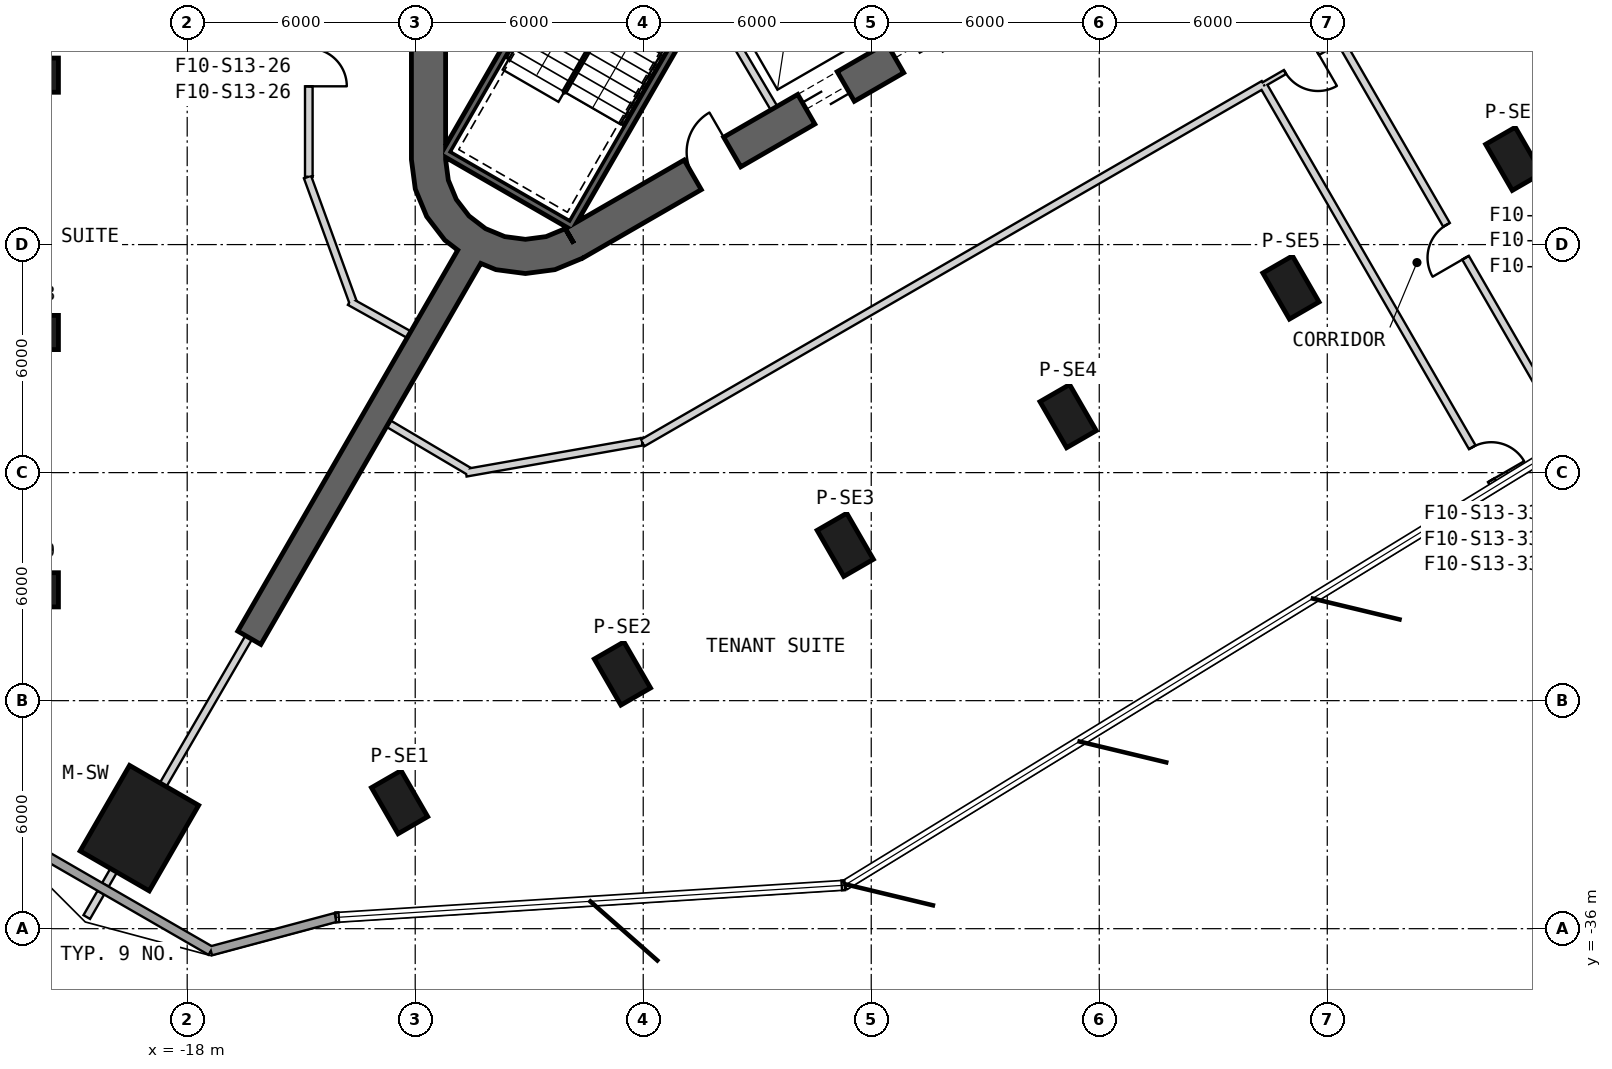
"""IFC4 building model, lengths in metres.
Left out: names, types, materials, properties, quantities, classifications, styles, units other than length and angle.
Written with IfcOpenShell. Run it as: python <this file> out.ifc"""

import sys

from ifc_helpers import new_model, si_unit, direction, frame, frame_2d, origin, origin_2d, place, context, subcontext, project, spatial, polyline, rectangle, outline, extrude, element, fill, save


model = new_model("IFC4")
c1 = context("Model", 3, precision=1e-05, world=origin(), true_north=direction((0.0, 1.0)))
c2 = subcontext(c1, "Body", "Model", "MODEL_VIEW")
j1 = project(units=[si_unit("LENGTHUNIT", "METRE"), si_unit("PLANEANGLEUNIT", "RADIAN")], contexts=[c1])
p1 = place(None, origin())
s1 = spatial("IfcSite", under=j1, at=p1, CompositionType="ELEMENT")
p2 = place(p1, origin())
s2 = spatial("IfcBuilding", under=s1, at=p2, CompositionType="ELEMENT")
p3 = place(p2, frame((0.0, 0.0, 217.2)))
s3 = spatial("IfcBuildingStorey", under=s2, at=p3, CompositionType="ELEMENT", Elevation=217.2)
p4 = place(p3, frame((-19.258, -33.355, 0.0), z_axis=(0.0, 0.0, 1.0), x_axis=(-0.5, -0.866025403784, 0.0)))
e1 = element("IfcColumn", 1, at=p4, inside=s3, PredefinedType="COLUMN", context=c2, shape_type="SweptSolid", body=[
    extrude(rectangle(XDim=2.6, YDim=2.1, at=origin_2d()), origin(), (0.0, 0.0, 1.0), 4.0),
])
for number, where, z_axis, x_axis in (
    (2, (-22.088, -13.542, 0.0), (0.0, 0.0, 1.0), (-1.0, 0.0, 0.0)),
    (3, (-22.088, -20.313, 0.0), (0.0, 0.0, 1.0), (-1.0, 0.0, 0.0)),
    (4, (-22.088, -27.084, 0.0), (0.0, 0.0, 1.0), (-1.0, 0.0, 0.0)),
    (5, (-12.411, -32.671, 0.0), (0.0, 0.0, 1.0), (0.5, -0.866, 0.0)),
    (6, (-6.548, -29.285, 0.0), (0.0, 0.0, 1.0), (0.5, -0.866, 0.0)),
    (7, (-0.684, -25.9, 0.0), (0.0, 0.0, 1.0), (0.5, -0.866, 0.0)),
    (8, (5.18, -22.514, 0.0), (0.0, 0.0, 1.0), (0.5, -0.866, 0.0)),
    (9, (11.044, -19.129, 0.0), (0.0, 0.0, 1.0), (0.5, -0.866, 0.0)),
    (10, (16.908, -15.743, 0.0), (0.0, 0.0, 1.0), (0.5, -0.866, 0.0)),
):
    element("IfcColumn", number, at=place(p3, frame(where, z_axis=z_axis, x_axis=x_axis)), inside=s3, PredefinedType="COLUMN", context=c2, shape_type="SweptSolid", body=[
        extrude(rectangle(XDim=1.4, YDim=0.9, at=origin_2d()), origin(), (0.0, 0.0, 1.0), 4.0),
    ])
p5 = place(p3, frame((-11.65, 15.762, 0.0), z_axis=(0.0, 0.0, 1.0), x_axis=(0.0, -1.0, 0.0)))
e11 = element("IfcWall", 11, at=p5, inside=s3, PredefinedType="SHEAR", context=c2, shape_type="SweptSolid", body=[
    extrude(rectangle(XDim=31.523, YDim=0.9, at=frame_2d((15.762, 0.0))), origin(), (0.0, 0.0, 1.0), 4.0),
])
p6 = place(p5, frame((7.062, 0.0, 0.0)))
e12 = element("IfcOpeningElement", 12, at=p6, cuts=e11, PredefinedType="OPENING", context=c2, shape_type="SweptSolid", body=[
    extrude(rectangle(XDim=1.2, YDim=2.4, at=frame_2d((0.6, 1.2))), frame((0.0, 0.46, 0.0), z_axis=(0.0, -1.0, 0.0), x_axis=(1.0, 0.0, 0.0)), (0.0, 0.0, 1.0), 0.92),
])
p7 = place(p5, frame((9.762, 0.0, 0.0)))
e13 = element("IfcOpeningElement", 13, at=p7, cuts=e11, PredefinedType="OPENING", context=c2, shape_type="SweptSolid", body=[
    extrude(rectangle(XDim=1.2, YDim=2.4, at=frame_2d((0.6, 1.2))), frame((0.0, 0.46, 0.0), z_axis=(0.0, -1.0, 0.0), x_axis=(1.0, 0.0, 0.0)), (0.0, 0.0, 1.0), 0.92),
])
p8 = place(p5, frame((12.462, 0.0, 0.0)))
e14 = element("IfcOpeningElement", 14, at=p8, cuts=e11, PredefinedType="OPENING", context=c2, shape_type="SweptSolid", body=[
    extrude(rectangle(XDim=1.2, YDim=2.4, at=frame_2d((0.6, 1.2))), frame((0.0, 0.46, 0.0), z_axis=(0.0, -1.0, 0.0), x_axis=(1.0, 0.0, 0.0)), (0.0, 0.0, 1.0), 0.92),
])
p9 = place(p5, frame((15.162, 0.0, 0.0)))
e15 = element("IfcOpeningElement", 15, at=p9, cuts=e11, PredefinedType="OPENING", context=c2, shape_type="SweptSolid", body=[
    extrude(rectangle(XDim=1.2, YDim=2.4, at=frame_2d((0.6, 1.2))), frame((0.0, 0.46, 0.0), z_axis=(0.0, -1.0, 0.0), x_axis=(1.0, 0.0, 0.0)), (0.0, 0.0, 1.0), 0.92),
])
p10 = place(p5, frame((17.862, 0.0, 0.0)))
e16 = element("IfcOpeningElement", 16, at=p10, cuts=e11, PredefinedType="OPENING", context=c2, shape_type="SweptSolid", body=[
    extrude(rectangle(XDim=1.2, YDim=2.4, at=frame_2d((0.6, 1.2))), frame((0.0, 0.46, 0.0), z_axis=(0.0, -1.0, 0.0), x_axis=(1.0, 0.0, 0.0)), (0.0, 0.0, 1.0), 0.92),
])
p11 = place(p5, frame((20.562, 0.0, 0.0)))
e17 = element("IfcOpeningElement", 17, at=p11, cuts=e11, PredefinedType="OPENING", context=c2, shape_type="SweptSolid", body=[
    extrude(rectangle(XDim=1.2, YDim=2.4, at=frame_2d((0.6, 1.2))), frame((0.0, 0.46, 0.0), z_axis=(0.0, -1.0, 0.0), x_axis=(1.0, 0.0, 0.0)), (0.0, 0.0, 1.0), 0.92),
])
p12 = place(p5, frame((23.262, 0.0, 0.0)))
e18 = element("IfcOpeningElement", 18, at=p12, cuts=e11, PredefinedType="OPENING", context=c2, shape_type="SweptSolid", body=[
    extrude(rectangle(XDim=1.2, YDim=2.4, at=frame_2d((0.6, 1.2))), frame((0.0, 0.46, 0.0), z_axis=(0.0, -1.0, 0.0), x_axis=(1.0, 0.0, 0.0)), (0.0, 0.0, 1.0), 0.92),
])
p13 = place(p5, frame((3.612, 0.0, 0.0)))
e19 = element("IfcOpeningElement", 19, at=p13, cuts=e11, PredefinedType="OPENING", context=c2, shape_type="SweptSolid", body=[
    extrude(rectangle(XDim=1.2, YDim=2.4, at=frame_2d((0.6, 1.2))), frame((0.0, 0.46, 0.0), z_axis=(0.0, -1.0, 0.0), x_axis=(1.0, 0.0, 0.0)), (0.0, 0.0, 1.0), 0.92),
])
p14 = place(p5, frame((26.712, 0.0, 0.0)))
e20 = element("IfcOpeningElement", 20, at=p14, cuts=e11, PredefinedType="OPENING", context=c2, shape_type="SweptSolid", body=[
    extrude(rectangle(XDim=1.2, YDim=2.4, at=frame_2d((0.6, 1.2))), frame((0.0, 0.46, 0.0), z_axis=(0.0, -1.0, 0.0), x_axis=(1.0, 0.0, 0.0)), (0.0, 0.0, 1.0), 0.92),
])
p15 = place(p3, frame((-7.825, -17.97, 0.0), z_axis=(0.0, 0.0, 1.0), x_axis=(0.866028369851, 0.499994862586, 0.0)))
e21 = element("IfcWall", 21, at=p15, inside=s3, PredefinedType="SHEAR", context=c2, shape_type="SweptSolid", body=[
    extrude(rectangle(XDim=31.523, YDim=0.9, at=frame_2d((15.762, 0.0))), origin(), (0.0, 0.0, 1.0), 4.0),
])
p16 = place(p15, frame((7.062, 0.0, 0.0)))
e22 = element("IfcOpeningElement", 22, at=p16, cuts=e21, PredefinedType="OPENING", context=c2, shape_type="SweptSolid", body=[
    extrude(rectangle(XDim=1.2, YDim=2.4, at=frame_2d((0.6, 1.2))), frame((0.0, 0.46, 0.0), z_axis=(0.0, -1.0, 0.0), x_axis=(1.0, 0.0, 0.0)), (0.0, 0.0, 1.0), 0.92),
])
p17 = place(p15, frame((9.762, 0.0, 0.0)))
e23 = element("IfcOpeningElement", 23, at=p17, cuts=e21, PredefinedType="OPENING", context=c2, shape_type="SweptSolid", body=[
    extrude(rectangle(XDim=1.2, YDim=2.4, at=frame_2d((0.6, 1.2))), frame((0.0, 0.46, 0.0), z_axis=(0.0, -1.0, 0.0), x_axis=(1.0, 0.0, 0.0)), (0.0, 0.0, 1.0), 0.92),
])
p18 = place(p15, frame((12.462, 0.0, 0.0)))
e24 = element("IfcOpeningElement", 24, at=p18, cuts=e21, PredefinedType="OPENING", context=c2, shape_type="SweptSolid", body=[
    extrude(rectangle(XDim=1.2, YDim=2.4, at=frame_2d((0.6, 1.2))), frame((0.0, 0.46, 0.0), z_axis=(0.0, -1.0, 0.0), x_axis=(1.0, 0.0, 0.0)), (0.0, 0.0, 1.0), 0.92),
])
p19 = place(p15, frame((15.162, 0.0, 0.0)))
e25 = element("IfcOpeningElement", 25, at=p19, cuts=e21, PredefinedType="OPENING", context=c2, shape_type="SweptSolid", body=[
    extrude(rectangle(XDim=1.2, YDim=2.4, at=frame_2d((0.6, 1.2))), frame((0.0, 0.46, 0.0), z_axis=(0.0, -1.0, 0.0), x_axis=(1.0, 0.0, 0.0)), (0.0, 0.0, 1.0), 0.92),
])
p20 = place(p15, frame((17.862, 0.0, 0.0)))
e26 = element("IfcOpeningElement", 26, at=p20, cuts=e21, PredefinedType="OPENING", context=c2, shape_type="SweptSolid", body=[
    extrude(rectangle(XDim=1.2, YDim=2.4, at=frame_2d((0.6, 1.2))), frame((0.0, 0.46, 0.0), z_axis=(0.0, -1.0, 0.0), x_axis=(1.0, 0.0, 0.0)), (0.0, 0.0, 1.0), 0.92),
])
p21 = place(p15, frame((20.562, 0.0, 0.0)))
e27 = element("IfcOpeningElement", 27, at=p21, cuts=e21, PredefinedType="OPENING", context=c2, shape_type="SweptSolid", body=[
    extrude(rectangle(XDim=1.2, YDim=2.4, at=frame_2d((0.6, 1.2))), frame((0.0, 0.46, 0.0), z_axis=(0.0, -1.0, 0.0), x_axis=(1.0, 0.0, 0.0)), (0.0, 0.0, 1.0), 0.92),
])
p22 = place(p15, frame((26.712, 0.0, 0.0)))
e28 = element("IfcOpeningElement", 28, at=p22, cuts=e21, PredefinedType="OPENING", context=c2, shape_type="SweptSolid", body=[
    extrude(rectangle(XDim=1.2, YDim=2.4, at=frame_2d((0.6, 1.2))), frame((0.0, 0.46, 0.0), z_axis=(0.0, -1.0, 0.0), x_axis=(1.0, 0.0, 0.0)), (0.0, 0.0, 1.0), 0.92),
])
p23 = place(p15, frame((3.612, 0.0, 0.0)))
e29 = element("IfcOpeningElement", 29, at=p23, cuts=e21, PredefinedType="OPENING", context=c2, shape_type="SweptSolid", body=[
    extrude(rectangle(XDim=1.2, YDim=2.4, at=frame_2d((0.6, 1.2))), frame((0.0, 0.46, 0.0), z_axis=(0.0, -1.0, 0.0), x_axis=(1.0, 0.0, 0.0)), (0.0, 0.0, 1.0), 0.92),
])
p24 = place(p3, origin())
e30 = element("IfcWall", 30, at=p24, inside=s3, PredefinedType="SHEAR", context=c2, shape_type="SweptSolid", body=[
    extrude(outline(polyline([(-12.1, -15.762), (-11.998, -16.538), (-11.698, -17.262), (-11.221, -17.883), (-10.6, -18.36), (-9.876, -18.659), (-9.1, -18.762), (-8.323, -18.659), (-7.6, -18.36), (-8.05, -17.58), (-8.556, -17.79), (-9.1, -17.862), (-9.644, -17.79), (-10.15, -17.58), (-10.585, -17.247), (-10.919, -16.812), (-11.128, -16.305), (-11.2, -15.762), (-12.1, -15.762)])), origin(), (0.0, 0.0, 1.0), 4.0),
])
p25 = place(p3, frame((-10.575, -18.316, 0.0), z_axis=(0.0, 0.0, 1.0), x_axis=(-0.499998001389, -0.86602655768, 0.0)))
e31 = element("IfcWall", 31, at=p25, inside=s3, PredefinedType="SHEAR", context=c2, shape_type="SweptSolid", body=[
    extrude(rectangle(XDim=11.581, YDim=0.7, at=frame_2d((5.791, 0.0))), origin(), (0.0, 0.0, 1.0), 4.0),
])
p26 = place(p3, frame((-22.995, -33.342, 0.0), z_axis=(0.0, 0.0, 1.0), x_axis=(0.866022628259, -0.50000480732, 0.0)))
e32 = element("IfcWall", 32, at=p26, inside=s3, PredefinedType="SOLIDWALL", context=c2, shape_type="SweptSolid", body=[
    extrude(rectangle(XDim=6.487, YDim=0.24, at=frame_2d((3.243, 0.0))), origin(), (0.0, 0.0, 1.0), 3.7),
])
p27 = place(p3, frame((-17.377, -36.585, 0.0), z_axis=(0.0, 0.0, 1.0), x_axis=(0.96591377161, 0.258864029586, 0.0)))
e33 = element("IfcWall", 33, at=p27, inside=s3, PredefinedType="SOLIDWALL", context=c2, shape_type="SweptSolid", body=[
    extrude(rectangle(XDim=3.402, YDim=0.24, at=frame_2d((1.701, 0.0))), origin(), (0.0, 0.0, 1.0), 3.7),
])
p28 = place(p3, frame((-2.558, -14.409, 0.0), z_axis=(0.0, 0.0, 1.0), x_axis=(-0.507997497166, 0.861358544901, 0.0)))
e34 = element("IfcWall", 34, at=p28, inside=s3, PredefinedType="PLUMBINGWALL", context=c2, shape_type="SweptSolid", body=[
    extrude(rectangle(XDim=3.35, YDim=0.2, at=frame_2d((1.675, 0.0))), origin(), (0.0, 0.0, 1.0), 3.7),
])
p29 = place(p3, frame((-3.905, -10.563, -0.3), z_axis=(0.0, 0.0, 1.0), x_axis=(-0.500012932018, -0.866017937352, 0.0)))
e35 = element("IfcWall", 35, at=p29, inside=s3, PredefinedType="SHEAR", context=c2, shape_type="SweptSolid", body=[
    extrude(rectangle(XDim=8.1, YDim=0.2, at=frame_2d((4.05, 0.0))), origin(), (0.0, 0.0, 1.0), 4.0),
])
p30 = place(p3, frame((-11.282, -15.541, -0.3), z_axis=(0.0, 0.0, 1.0), x_axis=(0.866000483506, -0.500043160704, 0.0)))
e36 = element("IfcWall", 36, at=p30, inside=s3, PredefinedType="SHEAR", context=c2, shape_type="SweptSolid", body=[
    extrude(rectangle(XDim=3.8, YDim=0.2, at=frame_2d((1.9, 0.0))), origin(), (0.0, 0.0, 1.0), 4.0),
])
p31 = place(p3, frame((-7.196, -8.663, -0.3), z_axis=(0.0, 0.0, 1.0), x_axis=(-0.499997992926, -0.866026562566, 0.0)))
e37 = element("IfcWall", 37, at=p31, inside=s3, PredefinedType="SHEAR", context=c2, shape_type="SweptSolid", body=[
    extrude(rectangle(XDim=7.9, YDim=0.2, at=frame_2d((3.95, 0.0))), origin(), (0.0, 0.0, 1.0), 4.0),
])
p32 = place(p3, frame((-13.722, -19.499, 0.0), z_axis=(0.0, 0.0, 1.0), x_axis=(0.873381780332, -0.487036205824, 0.0)))
e38 = element("IfcWall", 38, at=p32, inside=s3, PredefinedType="PARTITIONING", context=c2, shape_type="SweptSolid", body=[
    extrude(rectangle(XDim=1.785, YDim=0.2, at=frame_2d((0.892, 0.0))), origin(), (0.0, 0.0, 1.0), 3.7),
])
p33 = place(p3, frame((-14.834, -16.223, 0.0), z_axis=(0.0, 0.0, 1.0), x_axis=(0.342017717312, -0.939693503779, 0.0)))
e39 = element("IfcWall", 39, at=p33, inside=s3, PredefinedType="PARTITIONING", context=c2, shape_type="SweptSolid", body=[
    extrude(rectangle(XDim=3.497, YDim=0.2, at=frame_2d((1.749, 0.0))), origin(), (0.0, 0.0, 1.0), 2.78),
])
p34 = place(p3, frame((-14.8, -0.07, 0.0), z_axis=(0.0, 0.0, 1.0), x_axis=(0.0, -1.0, 0.0)))
e40 = element("IfcWall", 40, at=p34, inside=s3, PredefinedType="PARTITIONING", context=c2, shape_type="SweptSolid", body=[
    extrude(rectangle(XDim=16.147, YDim=0.2, at=frame_2d((8.073, 0.0))), origin(), (0.0, 0.0, 1.0), 2.88),
])
p35 = place(p34, frame((12.765, 0.0, 0.0)))
e41 = element("IfcOpeningElement", 41, at=p35, cuts=e40, PredefinedType="OPENING", context=c2, shape_type="SweptSolid", body=[
    extrude(rectangle(XDim=1.0, YDim=2.1, at=frame_2d((0.5, 1.05))), frame((0.0, 0.11, 0.0), z_axis=(0.0, -1.0, 0.0), x_axis=(1.0, 0.0, 0.0)), (0.0, 0.0, 1.0), 0.22),
])
p36 = place(p3, frame((12.317, -12.634, 0.0), z_axis=(0.0, 0.0, 1.0), x_axis=(-0.86602648383, -0.499998129301, 0.0)))
e42 = element("IfcWall", 42, at=p36, inside=s3, PredefinedType="PARTITIONING", context=c2, shape_type="SweptSolid", body=[
    extrude(rectangle(XDim=2.3, YDim=0.12, at=frame_2d((1.15, 0.0))), origin(), (0.0, 0.0, 1.0), 3.7),
])
p37 = place(p36, frame((0.65, 0.0, 0.0)))
e43 = element("IfcOpeningElement", 43, at=p37, cuts=e42, PredefinedType="OPENING", context=c2, shape_type="SweptSolid", body=[
    extrude(rectangle(XDim=1.0, YDim=2.1, at=frame_2d((0.5, 1.05))), frame((0.0, 0.07, 0.0), z_axis=(0.0, -1.0, 0.0), x_axis=(1.0, 0.0, 0.0)), (0.0, 0.0, 1.0), 0.14),
])
p38 = place(p3, frame((-6.019, -23.22, 0.0), z_axis=(0.0, 0.0, 1.0), x_axis=(0.86602143297, 0.50000687759, 0.0)))
e44 = element("IfcWall", 44, at=p38, inside=s3, PredefinedType="PARTITIONING", context=c2, shape_type="SweptSolid", body=[
    extrude(rectangle(XDim=18.873, YDim=0.2, at=frame_2d((9.437, 0.0))), origin(), (0.0, 0.0, 1.0), 2.88),
])
p39 = place(p3, frame((-10.665, -24.005, 0.0), z_axis=(0.0, 0.0, 1.0), x_axis=(0.984806532296, 0.173655100553, 0.0)))
e45 = element("IfcWall", 45, at=p39, inside=s3, PredefinedType="PARTITIONING", context=c2, shape_type="SweptSolid", body=[
    extrude(rectangle(XDim=4.706, YDim=0.2, at=frame_2d((2.353, 0.0))), origin(), (0.0, 0.0, 1.0), 2.78),
])
p40 = place(p3, frame((-12.707, -22.709, 0.0), z_axis=(0.0, 0.0, 1.0), x_axis=(0.860754387085, -0.509020515415, 0.0)))
e46 = element("IfcWall", 46, at=p40, inside=s3, PredefinedType="PARTITIONING", context=c2, shape_type="SweptSolid", body=[
    extrude(rectangle(XDim=2.457, YDim=0.2, at=frame_2d((1.229, 0.0))), origin(), (0.0, 0.0, 1.0), 3.7),
])
p41 = place(p3, frame((-19.934, -34.466, 0.0), z_axis=(0.0, 0.0, 1.0), x_axis=(-0.500286910726, -0.865859692419, 0.0)))
e47 = element("IfcWall", 47, at=p41, inside=s3, PredefinedType="PARTITIONING", context=c2, shape_type="SweptSolid", body=[
    extrude(rectangle(XDim=0.437, YDim=0.2, at=frame_2d((0.218, 0.0))), origin(), (0.0, 0.0, 1.0), 3.7),
])
p42 = place(p3, frame((-20.272, -35.052, 0.0), z_axis=(0.0, 0.0, 1.0), x_axis=(-0.500178781653, -0.865922159541, 0.0)))
e48 = element("IfcWall", 48, at=p42, inside=s3, PredefinedType="PARTITIONING", context=c2, shape_type="SweptSolid", body=[
    extrude(rectangle(XDim=0.741, YDim=0.2, at=frame_2d((0.371, 0.0))), origin(), (0.0, 0.0, 1.0), 3.7),
])
p43 = place(p3, frame((-16.381, -28.337, 0.0), z_axis=(0.0, 0.0, 1.0), x_axis=(-0.502306256161, -0.864689785427, 0.0)))
e49 = element("IfcWall", 49, at=p43, inside=s3, PredefinedType="PARTITIONING", context=c2, shape_type="SweptSolid", body=[
    extrude(rectangle(XDim=4.484, YDim=0.2, at=frame_2d((2.242, 0.0))), origin(), (0.0, 0.0, 1.0), 3.27),
])
p44 = place(p3, frame((18.412, -23.15, 0.0), z_axis=(0.0, 0.0, 1.0), x_axis=(-0.500010196161, 0.866019516948, 0.0)))
e50 = element("IfcWall", 50, at=p44, inside=s3, PredefinedType="PARTITIONING", context=c2, shape_type="SweptSolid", body=[
    extrude(rectangle(XDim=12.094, YDim=0.2, at=frame_2d((6.047, 0.0))), origin(), (0.0, 0.0, 1.0), 3.7),
])
p45 = place(p44, frame((5.547, 0.0, 0.0)))
e51 = element("IfcOpeningElement", 51, at=p45, cuts=e50, PredefinedType="OPENING", context=c2, shape_type="SweptSolid", body=[
    extrude(rectangle(XDim=1.0, YDim=2.1, at=frame_2d((0.5, 1.05))), frame((0.0, 0.11, 0.0), z_axis=(0.0, -1.0, 0.0), x_axis=(1.0, 0.0, 0.0)), (0.0, 0.0, 1.0), 0.22),
])
p46 = place(p3, frame((10.338, -13.846, 0.0), z_axis=(0.0, 0.0, 1.0), x_axis=(0.499990787361, -0.866030722639, 0.0)))
e52 = element("IfcWall", 52, at=p46, inside=s3, PredefinedType="PARTITIONING", context=c2, shape_type="SweptSolid", body=[
    extrude(rectangle(XDim=12.155, YDim=0.2, at=frame_2d((6.078, 0.0))), origin(), (0.0, 0.0, 1.0), 3.7),
])
p47 = place(p46, frame((10.955, 0.0, 0.0)))
e53 = element("IfcOpeningElement", 53, at=p47, cuts=e52, PredefinedType="OPENING", context=c2, shape_type="SweptSolid", body=[
    extrude(rectangle(XDim=1.0, YDim=2.1, at=frame_2d((0.5, 1.05))), frame((0.0, 0.11, 0.0), z_axis=(0.0, -1.0, 0.0), x_axis=(1.0, 0.0, 0.0)), (0.0, 0.0, 1.0), 0.22),
])
p48 = place(p37, origin())
e54 = element("IfcDoor", 54, at=p48, inside=s3, OperationType="SINGLE_SWING_RIGHT", PredefinedType="NOTDEFINED", context=c2, shape_type="SweptSolid", body=[
    extrude(rectangle(XDim=1.0, YDim=2.1, at=frame_2d((0.5, 1.05))), frame((0.0, 0.025, 0.0), z_axis=(0.0, -1.0, 0.0), x_axis=(1.0, 0.0, 0.0)), (0.0, 0.0, 1.0), 0.05),
])
fill(e43, e54)
p49 = place(p35, origin())
e55 = element("IfcDoor", 55, at=p49, inside=s3, OperationType="SINGLE_SWING_LEFT", PredefinedType="USERDEFINED", context=c2, shape_type="SweptSolid", body=[
    extrude(rectangle(XDim=1.0, YDim=2.1, at=frame_2d((0.5, 1.05))), frame((0.0, 0.025, 0.0), z_axis=(0.0, -1.0, 0.0), x_axis=(1.0, 0.0, 0.0)), (0.0, 0.0, 1.0), 0.05),
])
fill(e41, e55)
p50 = place(p45, origin())
e56 = element("IfcDoor", 56, at=p50, inside=s3, OperationType="SINGLE_SWING_LEFT", PredefinedType="USERDEFINED", context=c2, shape_type="SweptSolid", body=[
    extrude(rectangle(XDim=1.0, YDim=2.1, at=frame_2d((0.5, 1.05))), frame((0.0, 0.025, 0.0), z_axis=(0.0, -1.0, 0.0), x_axis=(1.0, 0.0, 0.0)), (0.0, 0.0, 1.0), 0.05),
])
fill(e51, e56)
p51 = place(p47, origin())
e57 = element("IfcDoor", 57, at=p51, inside=s3, OperationType="SINGLE_SWING_LEFT", PredefinedType="USERDEFINED", context=c2, shape_type="SweptSolid", body=[
    extrude(rectangle(XDim=1.0, YDim=2.1, at=frame_2d((0.5, 1.05))), frame((0.0, 0.025, 0.0), z_axis=(0.0, -1.0, 0.0), x_axis=(1.0, 0.0, 0.0)), (0.0, 0.0, 1.0), 0.05),
])
fill(e53, e57)
p52 = place(p16, origin())
e58 = element("IfcDoor", 58, at=p52, inside=s3, OperationType="SLIDING_TO_LEFT", PredefinedType="USERDEFINED", context=c2, shape_type="SweptSolid", body=[
    extrude(rectangle(XDim=1.2, YDim=2.4, at=frame_2d((0.6, 1.2))), frame((0.0, 0.025, 0.0), z_axis=(0.0, -1.0, 0.0), x_axis=(1.0, 0.0, 0.0)), (0.0, 0.0, 1.0), 0.05),
])
fill(e22, e58)
p53 = place(p17, origin())
e59 = element("IfcDoor", 59, at=p53, inside=s3, OperationType="SLIDING_TO_LEFT", PredefinedType="USERDEFINED", context=c2, shape_type="SweptSolid", body=[
    extrude(rectangle(XDim=1.2, YDim=2.4, at=frame_2d((0.6, 1.2))), frame((0.0, 0.025, 0.0), z_axis=(0.0, -1.0, 0.0), x_axis=(1.0, 0.0, 0.0)), (0.0, 0.0, 1.0), 0.05),
])
fill(e23, e59)
p54 = place(p23, origin())
e60 = element("IfcDoor", 60, at=p54, inside=s3, OperationType="SINGLE_SWING_LEFT", PredefinedType="USERDEFINED", context=c2, shape_type="SweptSolid", body=[
    extrude(rectangle(XDim=1.2, YDim=2.4, at=frame_2d((0.6, 1.2))), frame((0.0, 0.025, 0.0), z_axis=(0.0, -1.0, 0.0), x_axis=(1.0, 0.0, 0.0)), (0.0, 0.0, 1.0), 0.05),
])
fill(e29, e60)
save(model, sys.argv[1])
